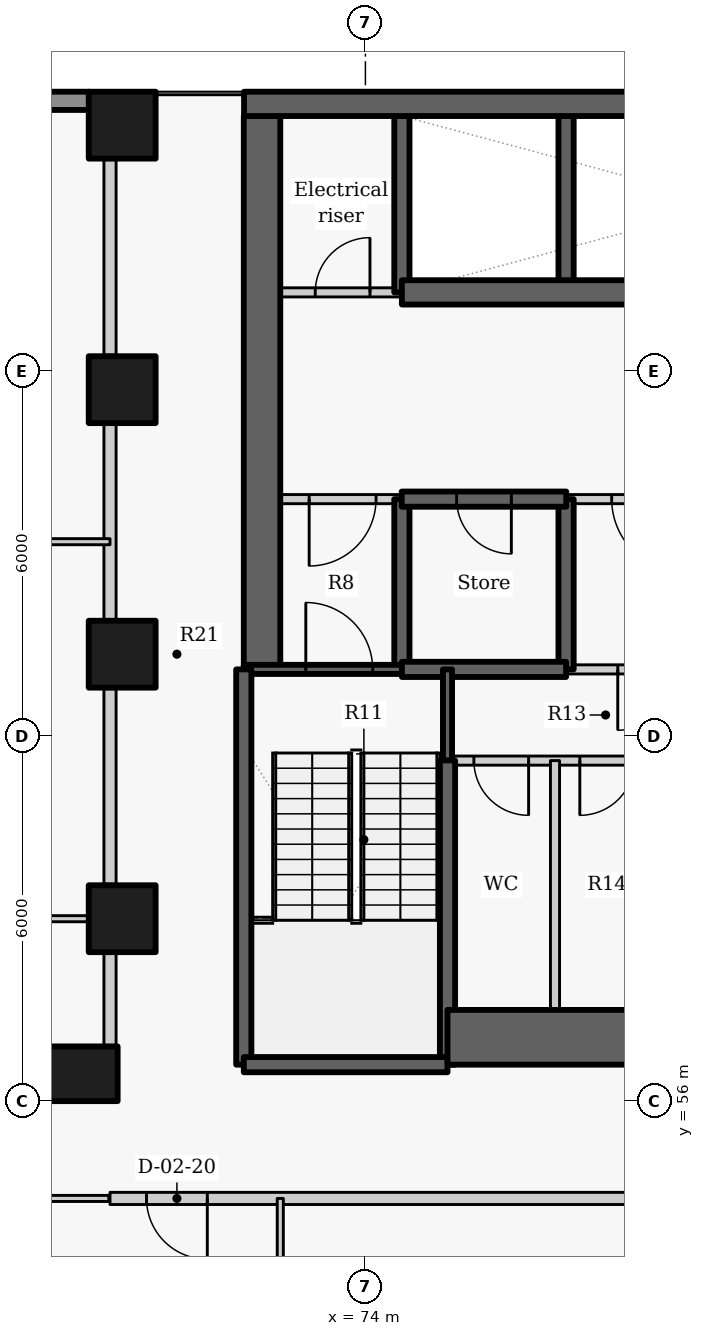
"""IFC4 building model, lengths in metres.
Left out: names, types, materials, properties, quantities, classifications, styles, units other than length and angle.
Written with IfcOpenShell. Run it as: python <this file> out.ifc"""

import sys

from ifc_helpers import new_model, si_unit, direction, frame, frame_2d, origin, origin_2d, place, context, subcontext, project, spatial, rectangle, extrude, element, fill, save


model = new_model("IFC4")
c1 = context("Model", 3, precision=1e-05, world=origin(), true_north=direction((0.0, 1.0)))
c2 = subcontext(c1, "Body", "Model", "MODEL_VIEW")
j1 = project(units=[si_unit("LENGTHUNIT", "METRE"), si_unit("PLANEANGLEUNIT", "RADIAN")], contexts=[c1])
p1 = place(None, origin())
s1 = spatial("IfcSite", under=j1, at=p1, CompositionType="ELEMENT")
p2 = place(p1, origin())
s2 = spatial("IfcBuilding", under=s1, at=p2, CompositionType="ELEMENT")
p3 = place(p2, frame((0.0, 0.0, 15.6)))
s3 = spatial("IfcBuildingStorey", under=s2, at=p3, CompositionType="ELEMENT", Elevation=15.6)
p4 = place(p3, frame((69.175, 56.45, 0.0), z_axis=(0.0, 0.0, 1.0), x_axis=(1.0, 0.0, 0.0)))
e1 = element("IfcColumn", 1, at=p4, inside=s3, PredefinedType="COLUMN", context=c2, shape_type="SweptSolid", body=[
    extrude(rectangle(XDim=1.5, YDim=0.9, at=origin_2d()), origin(), (0.0, 0.0, 1.0), 4.2),
])
for number, where, z_axis, x_axis in (
    (2, (70.0, 72.05, 0.0), (0.0, 0.0, 1.0), (0.0, -1.0, 0.0)),
    (3, (70.0, 67.7, 0.0), (0.0, 0.0, 1.0), (0.0, -1.0, 0.0)),
    (4, (70.0, 63.35, 0.0), (0.0, 0.0, 1.0), (0.0, -1.0, 0.0)),
    (5, (70.0, 59.0, 0.0), (0.0, 0.0, 1.0), (0.0, -1.0, 0.0)),
):
    element("IfcColumn", number, at=place(p3, frame(where, z_axis=z_axis, x_axis=x_axis)), inside=s3, PredefinedType="COLUMN", context=c2, shape_type="SweptSolid", body=[
        extrude(rectangle(XDim=1.1, YDim=1.1, at=origin_2d()), origin(), (0.0, 0.0, 1.0), 4.2),
    ])
p5 = place(p3, frame((69.454, 72.45, 0.0), z_axis=(0.0, 0.0, 1.0), x_axis=(-1.0, 0.0, 0.0)))
e6 = element("IfcWall", 6, at=p5, inside=s3, PredefinedType="SOLIDWALL", context=c2, shape_type="SweptSolid", body=[
    extrude(rectangle(XDim=6.016, YDim=0.3, at=frame_2d((3.008, 0.0))), origin(), (0.0, 0.0, 1.0), 3.0),
])
p6 = place(p5, frame((1.958, 0.0, 0.9)))
e7 = element("IfcOpeningElement", 7, at=p6, cuts=e6, PredefinedType="OPENING", context=c2, shape_type="SweptSolid", body=[
    extrude(rectangle(XDim=2.1, YDim=2.05, at=frame_2d((1.05, 1.025))), frame((0.0, 0.16, 0.0), z_axis=(0.0, -1.0, 0.0), x_axis=(1.0, 0.0, 0.0)), (0.0, 0.0, 1.0), 0.32),
])
p7 = place(p3, frame((74.6, 63.1, -0.3), z_axis=(0.0, 0.0, 1.0), x_axis=(0.0, 1.0, 0.0)))
e8 = element("IfcWall", 8, at=p7, inside=s3, PredefinedType="SHEAR", context=c2, shape_type="SweptSolid", body=[
    extrude(rectangle(XDim=2.8, YDim=0.25, at=frame_2d((1.4, 0.0))), origin(), (0.0, 0.0, 1.0), 4.2),
])
p8 = place(p3, frame((74.6, 69.3, -0.3), z_axis=(0.0, 0.0, 1.0), x_axis=(0.0, 1.0, 0.0)))
e9 = element("IfcWall", 9, at=p8, inside=s3, PredefinedType="SHEAR", context=c2, shape_type="SweptSolid", body=[
    extrude(rectangle(XDim=2.9, YDim=0.25, at=frame_2d((1.45, 0.0))), origin(), (0.0, 0.0, 1.0), 4.2),
])
p9 = place(p3, frame((72.0, 69.3, 0.0), z_axis=(0.0, 0.0, 1.0), x_axis=(1.0, 0.0, 0.0)))
e10 = element("IfcWall", 10, at=p9, inside=s3, PredefinedType="PARTITIONING", context=c2, shape_type="SweptSolid", body=[
    extrude(rectangle(XDim=2.6, YDim=0.15, at=frame_2d((1.3, 0.0))), origin(), (0.0, 0.0, 1.0), 3.9),
])
p10 = place(p9, frame((1.175, 0.0, 0.0)))
e11 = element("IfcOpeningElement", 11, at=p10, cuts=e10, PredefinedType="OPENING", context=c2, shape_type="SweptSolid", body=[
    extrude(rectangle(XDim=0.9, YDim=2.1, at=frame_2d((0.45, 1.05))), frame((0.0, 0.085, 0.0), z_axis=(0.0, -1.0, 0.0), x_axis=(1.0, 0.0, 0.0)), (0.0, 0.0, 1.0), 0.17),
])
p11 = place(p3, frame((72.3, 63.1, -0.3), z_axis=(0.0, 0.0, 1.0), x_axis=(0.0, 1.0, 0.0)))
e12 = element("IfcWall", 12, at=p11, inside=s3, PredefinedType="SHEAR", context=c2, shape_type="SweptSolid", body=[
    extrude(rectangle(XDim=9.1, YDim=0.6, at=frame_2d((4.55, 0.0))), origin(), (0.0, 0.0, 1.0), 4.2),
])
p12 = place(p3, frame((77.3, 63.1, -0.3), z_axis=(0.0, 0.0, 1.0), x_axis=(0.0, 1.0, 0.0)))
e13 = element("IfcWall", 13, at=p12, inside=s3, PredefinedType="SHEAR", context=c2, shape_type="SweptSolid", body=[
    extrude(rectangle(XDim=2.8, YDim=0.25, at=frame_2d((1.4, 0.0))), origin(), (0.0, 0.0, 1.0), 4.2),
])
p13 = place(p3, frame((77.3, 69.3, -0.3), z_axis=(0.0, 0.0, 1.0), x_axis=(0.0, 1.0, 0.0)))
e14 = element("IfcWall", 14, at=p13, inside=s3, PredefinedType="SHEAR", context=c2, shape_type="SweptSolid", body=[
    extrude(rectangle(XDim=2.9, YDim=0.25, at=frame_2d((1.45, 0.0))), origin(), (0.0, 0.0, 1.0), 4.2),
])
p14 = place(p3, frame((74.6, 69.3, -0.3), z_axis=(0.0, 0.0, 1.0), x_axis=(1.0, 0.0, 0.0)))
e15 = element("IfcWall", 15, at=p14, inside=s3, PredefinedType="SHEAR", context=c2, shape_type="SweptSolid", body=[
    extrude(rectangle(XDim=10.8, YDim=0.4, at=frame_2d((5.4, 0.0))), origin(), (0.0, 0.0, 1.0), 4.2),
])
p15 = place(p3, frame((74.603, 65.9, 0.0), z_axis=(0.0, 0.0, 1.0), x_axis=(-1.0, 0.0, 0.0)))
e16 = element("IfcWall", 16, at=p15, inside=s3, PredefinedType="PARTITIONING", context=c2, shape_type="SweptSolid", body=[
    extrude(rectangle(XDim=2.603, YDim=0.15, at=frame_2d((1.302, 0.0))), origin(), (0.0, 0.0, 1.0), 3.9),
])
p16 = place(p15, frame((0.428, 0.0, 0.0)))
e17 = element("IfcOpeningElement", 17, at=p16, cuts=e16, PredefinedType="OPENING", context=c2, shape_type="SweptSolid", body=[
    extrude(rectangle(XDim=1.1, YDim=2.1, at=frame_2d((0.55, 1.05))), frame((0.0, 0.085, 0.0), z_axis=(0.0, -1.0, 0.0), x_axis=(1.0, 0.0, 0.0)), (0.0, 0.0, 1.0), 0.17),
])
p17 = place(p3, frame((80.003, 65.9, 0.0), z_axis=(0.0, 0.0, 1.0), x_axis=(-1.0, 0.0, 0.0)))
e18 = element("IfcWall", 18, at=p17, inside=s3, PredefinedType="PARTITIONING", context=c2, shape_type="SweptSolid", body=[
    extrude(rectangle(XDim=2.706, YDim=0.15, at=frame_2d((1.353, 0.0))), origin(), (0.0, 0.0, 1.0), 3.9),
])
p18 = place(p17, frame((0.753, 0.0, 0.0)))
e19 = element("IfcOpeningElement", 19, at=p18, cuts=e18, PredefinedType="OPENING", context=c2, shape_type="SweptSolid", body=[
    extrude(rectangle(XDim=1.2, YDim=2.1, at=frame_2d((0.6, 1.05))), frame((0.0, 0.085, 0.0), z_axis=(0.0, -1.0, 0.0), x_axis=(1.0, 0.0, 0.0)), (0.0, 0.0, 1.0), 0.17),
])
p19 = place(p3, frame((77.303, 65.9, -0.3), z_axis=(0.0, 0.0, 1.0), x_axis=(-1.0, 0.0, 0.0)))
e20 = element("IfcWall", 20, at=p19, inside=s3, PredefinedType="SHEAR", context=c2, shape_type="SweptSolid", body=[
    extrude(rectangle(XDim=2.706, YDim=0.25, at=frame_2d((1.353, 0.0))), origin(), (0.0, 0.0, 1.0), 4.2),
])
p20 = place(p19, frame((0.903, 0.0, 0.3)))
e21 = element("IfcOpeningElement", 21, at=p20, cuts=e20, PredefinedType="OPENING", context=c2, shape_type="SweptSolid", body=[
    extrude(rectangle(XDim=0.9, YDim=2.1, at=frame_2d((0.45, 1.05))), frame((0.0, 0.135, 0.0), z_axis=(0.0, -1.0, 0.0), x_axis=(1.0, 0.0, 0.0)), (0.0, 0.0, 1.0), 0.27),
])
p21 = place(p3, frame((72.0, 63.1, -0.3), z_axis=(0.0, 0.0, 1.0), x_axis=(1.0, 0.0, 0.0)))
e22 = element("IfcWall", 22, at=p21, inside=s3, PredefinedType="SHEAR", context=c2, shape_type="SweptSolid", body=[
    extrude(rectangle(XDim=2.6, YDim=0.15, at=frame_2d((1.3, 0.0))), origin(), (0.0, 0.0, 1.0), 4.2),
])
p22 = place(p21, frame((1.02, 0.0, 0.3)))
e23 = element("IfcOpeningElement", 23, at=p22, cuts=e22, PredefinedType="OPENING", context=c2, shape_type="SweptSolid", body=[
    extrude(rectangle(XDim=1.1, YDim=2.1, at=frame_2d((0.55, 1.05))), frame((0.0, 0.085, 0.0), z_axis=(0.0, -1.0, 0.0), x_axis=(1.0, 0.0, 0.0)), (0.0, 0.0, 1.0), 0.17),
])
p23 = place(p3, frame((74.6, 63.1, -0.3), z_axis=(0.0, 0.0, 1.0), x_axis=(1.0, 0.0, 0.0)))
e24 = element("IfcWall", 24, at=p23, inside=s3, PredefinedType="SHEAR", context=c2, shape_type="SweptSolid", body=[
    extrude(rectangle(XDim=2.7, YDim=0.25, at=frame_2d((1.35, 0.0))), origin(), (0.0, 0.0, 1.0), 4.2),
])
p24 = place(p3, frame((80.0, 63.1, 0.0), z_axis=(0.0, 0.0, 1.0), x_axis=(-1.0, 0.0, 0.0)))
e25 = element("IfcWall", 25, at=p24, inside=s3, PredefinedType="PARTITIONING", context=c2, shape_type="SweptSolid", body=[
    extrude(rectangle(XDim=2.7, YDim=0.15, at=frame_2d((1.35, 0.0))), origin(), (0.0, 0.0, 1.0), 3.9),
])
p25 = place(p24, frame((0.85, 0.0, 0.0)))
e26 = element("IfcOpeningElement", 26, at=p25, cuts=e25, PredefinedType="OPENING", context=c2, shape_type="SweptSolid", body=[
    extrude(rectangle(XDim=1.0, YDim=2.1, at=frame_2d((0.5, 1.05))), frame((0.0, 0.085, 0.0), z_axis=(0.0, -1.0, 0.0), x_axis=(1.0, 0.0, 0.0)), (0.0, 0.0, 1.0), 0.17),
])
p26 = place(p3, frame((75.35, 61.597, -0.3), z_axis=(0.0, 0.0, 1.0), x_axis=(0.0, 1.0, 0.0)))
e27 = element("IfcWall", 27, at=p26, inside=s3, PredefinedType="SHEAR", context=c2, shape_type="SweptSolid", body=[
    extrude(rectangle(XDim=1.503, YDim=0.15, at=frame_2d((0.751, 0.0))), origin(), (0.0, 0.0, 1.0), 4.2),
])
p27 = place(p3, frame((75.35, 56.6, -0.3), z_axis=(0.0, 0.0, 1.0), x_axis=(0.0, 1.0, 0.0)))
e28 = element("IfcWall", 28, at=p27, inside=s3, PredefinedType="SHEAR", context=c2, shape_type="SweptSolid", body=[
    extrude(rectangle(XDim=5.003, YDim=0.25, at=frame_2d((2.501, 0.0))), origin(), (0.0, 0.0, 1.0), 4.2),
])
p28 = place(p3, frame((72.0, 56.6, -0.3), z_axis=(0.0, 0.0, 1.0), x_axis=(0.0, 1.0, 0.0)))
e29 = element("IfcWall", 29, at=p28, inside=s3, PredefinedType="SHEAR", context=c2, shape_type="SweptSolid", body=[
    extrude(rectangle(XDim=6.5, YDim=0.25, at=frame_2d((3.25, 0.0))), origin(), (0.0, 0.0, 1.0), 4.2),
])
p29 = place(p3, frame((72.0, 56.6, -0.3), z_axis=(0.0, 0.0, 1.0), x_axis=(1.0, 0.0, 0.0)))
e30 = element("IfcWall", 30, at=p29, inside=s3, PredefinedType="SHEAR", context=c2, shape_type="SweptSolid", body=[
    extrude(rectangle(XDim=3.35, YDim=0.25, at=frame_2d((1.675, 0.0))), origin(), (0.0, 0.0, 1.0), 4.2),
])
p30 = place(p3, frame((75.35, 57.05, -0.3), z_axis=(0.0, 0.0, 1.0), x_axis=(1.0, 0.0, 0.0)))
e31 = element("IfcWall", 31, at=p30, inside=s3, PredefinedType="SHEAR", context=c2, shape_type="SweptSolid", body=[
    extrude(rectangle(XDim=5.2, YDim=0.9, at=frame_2d((2.6, 0.0))), origin(), (0.0, 0.0, 1.0), 4.2),
])
p31 = place(p3, frame((80.55, 61.6, 0.0), z_axis=(0.0, 0.0, 1.0), x_axis=(-1.0, 0.0, 0.0)))
e32 = element("IfcWall", 32, at=p31, inside=s3, PredefinedType="PARTITIONING", context=c2, shape_type="SweptSolid", body=[
    extrude(rectangle(XDim=5.2, YDim=0.15, at=frame_2d((2.6, 0.0))), origin(), (0.0, 0.0, 1.0), 3.9),
])
p32 = place(p31, frame((3.866, 0.0, 0.0)))
e33 = element("IfcOpeningElement", 33, at=p32, cuts=e32, PredefinedType="OPENING", context=c2, shape_type="SweptSolid", body=[
    extrude(rectangle(XDim=0.9, YDim=2.1, at=frame_2d((0.45, 1.05))), frame((0.0, 0.085, 0.0), z_axis=(0.0, -1.0, 0.0), x_axis=(1.0, 0.0, 0.0)), (0.0, 0.0, 1.0), 0.17),
])
p33 = place(p31, frame((2.124, 0.0, 0.0)))
e34 = element("IfcOpeningElement", 34, at=p33, cuts=e32, PredefinedType="OPENING", context=c2, shape_type="SweptSolid", body=[
    extrude(rectangle(XDim=0.9, YDim=2.1, at=frame_2d((0.45, 1.05))), frame((0.0, 0.085, 0.0), z_axis=(0.0, -1.0, 0.0), x_axis=(1.0, 0.0, 0.0)), (0.0, 0.0, 1.0), 0.17),
])
p34 = place(p31, frame((0.408, 0.0, 0.0)))
e35 = element("IfcOpeningElement", 35, at=p34, cuts=e32, PredefinedType="OPENING", context=c2, shape_type="SweptSolid", body=[
    extrude(rectangle(XDim=0.9, YDim=2.1, at=frame_2d((0.45, 1.05))), frame((0.0, 0.085, 0.0), z_axis=(0.0, -1.0, 0.0), x_axis=(1.0, 0.0, 0.0)), (0.0, 0.0, 1.0), 0.17),
])
p35 = place(p3, frame((77.118, 56.6, 0.0), z_axis=(0.0, 0.0, 1.0), x_axis=(0.0, 1.0, 0.0)))
e36 = element("IfcWall", 36, at=p35, inside=s3, PredefinedType="PARTITIONING", context=c2, shape_type="SweptSolid", body=[
    extrude(rectangle(XDim=5.0, YDim=0.15, at=frame_2d((2.5, 0.0))), origin(), (0.0, 0.0, 1.0), 3.9),
])
p36 = place(p3, frame((69.8, 56.917, 0.0), z_axis=(0.0, 0.0, 1.0), x_axis=(0.0, 1.0, 0.0)))
e37 = element("IfcWall", 37, at=p36, inside=s3, PredefinedType="PARTITIONING", context=c2, shape_type="SweptSolid", body=[
    extrude(rectangle(XDim=1.516, YDim=0.2, at=frame_2d((0.758, 0.0))), origin(), (0.0, 0.0, 1.0), 3.9),
])
for number, where, z_axis, x_axis in (
    (38, (69.8, 59.567, 0.0), (0.0, 0.0, 1.0), (0.0, 1.0, 0.0)),
    (39, (69.8, 63.917, 0.0), (0.0, 0.0, 1.0), (0.0, 1.0, 0.0)),
):
    element("IfcWall", number, at=place(p3, frame(where, z_axis=z_axis, x_axis=x_axis)), inside=s3, PredefinedType="PARTITIONING", context=c2, shape_type="SweptSolid", body=[
        extrude(rectangle(XDim=3.216, YDim=0.2, at=frame_2d((1.608, 0.0))), origin(), (0.0, 0.0, 1.0), 3.13),
    ])
p37 = place(p3, frame((69.8, 68.267, 0.0), z_axis=(0.0, 0.0, 1.0), x_axis=(0.0, 1.0, 0.0)))
e40 = element("IfcWall", 40, at=p37, inside=s3, PredefinedType="PARTITIONING", context=c2, shape_type="SweptSolid", body=[
    extrude(rectangle(XDim=3.216, YDim=0.2, at=frame_2d((1.608, 0.0))), origin(), (0.0, 0.0, 1.0), 3.13),
])
p38 = place(p3, frame((90.2, 54.4, 0.0), z_axis=(0.0, 0.0, 1.0), x_axis=(-1.0, 0.0, 0.0)))
e41 = element("IfcWall", 41, at=p38, inside=s3, PredefinedType="PARTITIONING", context=c2, shape_type="SweptSolid", body=[
    extrude(rectangle(XDim=20.4, YDim=0.2, at=frame_2d((10.2, 0.0))), origin(), (0.0, 0.0, 1.0), 3.9),
])
p39 = place(p38, frame((18.8, 0.0, 0.0)))
e42 = element("IfcOpeningElement", 42, at=p39, cuts=e41, PredefinedType="OPENING", context=c2, shape_type="SweptSolid", body=[
    extrude(rectangle(XDim=1.0, YDim=2.1, at=frame_2d((0.5, 1.05))), frame((0.0, 0.11, 0.0), z_axis=(0.0, -1.0, 0.0), x_axis=(1.0, 0.0, 0.0)), (0.0, 0.0, 1.0), 0.22),
])
p40 = place(p38, frame((0.6, 0.0, 0.0)))
e43 = element("IfcOpeningElement", 43, at=p40, cuts=e41, PredefinedType="OPENING", context=c2, shape_type="SweptSolid", body=[
    extrude(rectangle(XDim=1.0, YDim=2.1, at=frame_2d((0.5, 1.05))), frame((0.0, 0.11, 0.0), z_axis=(0.0, -1.0, 0.0), x_axis=(1.0, 0.0, 0.0)), (0.0, 0.0, 1.0), 0.22),
])
p41 = place(p38, frame((10.1, 0.0, 0.0)))
e44 = element("IfcOpeningElement", 44, at=p41, cuts=e41, PredefinedType="OPENING", context=c2, shape_type="SweptSolid", body=[
    extrude(rectangle(XDim=1.0, YDim=2.1, at=frame_2d((0.5, 1.05))), frame((0.0, 0.11, 0.0), z_axis=(0.0, -1.0, 0.0), x_axis=(1.0, 0.0, 0.0)), (0.0, 0.0, 1.0), 0.22),
])
p42 = place(p3, frame((62.434, 65.2, 0.0), z_axis=(0.0, 0.0, 1.0), x_axis=(1.0, 0.0, 0.0)))
e45 = element("IfcWall", 45, at=p42, inside=s3, PredefinedType="PARTITIONING", context=c2, shape_type="SweptSolid", body=[
    extrude(rectangle(XDim=7.366, YDim=0.1, at=frame_2d((3.683, 0.0))), origin(), (0.0, 0.0, 1.0), 3.9),
])
p43 = place(p3, frame((65.495, 59.0, 0.0), z_axis=(0.0, 0.0, 1.0), x_axis=(1.0, 0.0, 0.0)))
e46 = element("IfcWall", 46, at=p43, inside=s3, PredefinedType="PARTITIONING", context=c2, shape_type="SweptSolid", body=[
    extrude(rectangle(XDim=3.935, YDim=0.1, at=frame_2d((1.967, 0.0))), origin(), (0.0, 0.0, 1.0), 3.9),
])
p44 = place(p3, frame((72.6, 47.3, 0.0), z_axis=(0.0, 0.0, 1.0), x_axis=(0.0, 1.0, 0.0)))
e47 = element("IfcWall", 47, at=p44, inside=s3, PredefinedType="PARTITIONING", context=c2, shape_type="SweptSolid", body=[
    extrude(rectangle(XDim=7.1, YDim=0.1, at=frame_2d((3.55, 0.0))), origin(), (0.0, 0.0, 1.0), 3.13),
])
p45 = place(p3, frame((59.52, 54.4, 0.0), z_axis=(0.0, 0.0, 1.0), x_axis=(1.0, 0.0, 0.0)))
e48 = element("IfcWall", 48, at=p45, inside=s3, PredefinedType="PARTITIONING", context=c2, shape_type="SweptSolid", body=[
    extrude(rectangle(XDim=10.26, YDim=0.1, at=frame_2d((5.13, 0.0))), origin(), (0.0, 0.0, 1.0), 3.9),
])
p46 = place(p3, frame((72.004, 72.4, -0.3), z_axis=(0.0, 0.0, 1.0), x_axis=(1.0, 0.0, 0.0)))
e49 = element("IfcWall", 49, at=p46, inside=s3, PredefinedType="SHEAR", context=c2, shape_type="SweptSolid", body=[
    extrude(rectangle(XDim=15.992, YDim=0.4, at=frame_2d((7.996, 0.0))), origin(), (0.0, 0.0, 1.0), 4.2),
])
p47 = place(p10, origin())
e50 = element("IfcDoor", 50, at=p47, inside=s3, OperationType="SINGLE_SWING_RIGHT", PredefinedType="DOOR", context=c2, shape_type="SweptSolid", body=[
    extrude(rectangle(XDim=0.9, YDim=2.1, at=frame_2d((0.45, 1.05))), frame((0.0, 0.025, 0.0), z_axis=(0.0, -1.0, 0.0), x_axis=(1.0, 0.0, 0.0)), (0.0, 0.0, 1.0), 0.05),
])
fill(e11, e50)
p48 = place(p16, origin())
e51 = element("IfcDoor", 51, at=p48, inside=s3, OperationType="SINGLE_SWING_RIGHT", PredefinedType="DOOR", context=c2, shape_type="SweptSolid", body=[
    extrude(rectangle(XDim=1.1, YDim=2.1, at=frame_2d((0.55, 1.05))), frame((0.0, 0.025, 0.0), z_axis=(0.0, -1.0, 0.0), x_axis=(1.0, 0.0, 0.0)), (0.0, 0.0, 1.0), 0.05),
])
fill(e17, e51)
p49 = place(p20, origin())
e52 = element("IfcDoor", 52, at=p49, inside=s3, OperationType="SINGLE_SWING_LEFT", PredefinedType="DOOR", context=c2, shape_type="SweptSolid", body=[
    extrude(rectangle(XDim=0.9, YDim=2.1, at=frame_2d((0.45, 1.05))), frame((0.0, 0.025, 0.0), z_axis=(0.0, -1.0, 0.0), x_axis=(1.0, 0.0, 0.0)), (0.0, 0.0, 1.0), 0.05),
])
fill(e21, e52)
p50 = place(p18, origin())
e53 = element("IfcDoor", 53, at=p50, inside=s3, OperationType="DOUBLE_DOOR_SINGLE_SWING", PredefinedType="DOOR", context=c2, shape_type="SweptSolid", body=[
    extrude(rectangle(XDim=1.2, YDim=2.1, at=frame_2d((0.6, 1.05))), frame((0.0, 0.025, 0.0), z_axis=(0.0, -1.0, 0.0), x_axis=(1.0, 0.0, 0.0)), (0.0, 0.0, 1.0), 0.05),
])
fill(e19, e53)
p51 = place(p25, origin())
e54 = element("IfcDoor", 54, at=p51, inside=s3, OperationType="SINGLE_SWING_RIGHT", PredefinedType="DOOR", context=c2, shape_type="SweptSolid", body=[
    extrude(rectangle(XDim=1.0, YDim=2.1, at=frame_2d((0.5, 1.05))), frame((0.0, 0.025, 0.0), z_axis=(0.0, -1.0, 0.0), x_axis=(1.0, 0.0, 0.0)), (0.0, 0.0, 1.0), 0.05),
])
fill(e26, e54)
p52 = place(p32, origin())
e55 = element("IfcDoor", 55, at=p52, inside=s3, OperationType="SINGLE_SWING_LEFT", PredefinedType="DOOR", context=c2, shape_type="SweptSolid", body=[
    extrude(rectangle(XDim=0.9, YDim=2.1, at=frame_2d((0.45, 1.05))), frame((0.0, 0.025, 0.0), z_axis=(0.0, -1.0, 0.0), x_axis=(1.0, 0.0, 0.0)), (0.0, 0.0, 1.0), 0.05),
])
fill(e33, e55)
p53 = place(p33, origin())
e56 = element("IfcDoor", 56, at=p53, inside=s3, OperationType="SINGLE_SWING_RIGHT", PredefinedType="DOOR", context=c2, shape_type="SweptSolid", body=[
    extrude(rectangle(XDim=0.9, YDim=2.1, at=frame_2d((0.45, 1.05))), frame((0.0, 0.025, 0.0), z_axis=(0.0, -1.0, 0.0), x_axis=(1.0, 0.0, 0.0)), (0.0, 0.0, 1.0), 0.05),
])
fill(e34, e56)
p54 = place(p22, origin())
e57 = element("IfcDoor", 57, at=p54, inside=s3, OperationType="SINGLE_SWING_LEFT", PredefinedType="DOOR", context=c2, shape_type="SweptSolid", body=[
    extrude(rectangle(XDim=1.1, YDim=2.1, at=frame_2d((0.55, 1.05))), frame((0.0, 0.025, 0.0), z_axis=(0.0, -1.0, 0.0), x_axis=(1.0, 0.0, 0.0)), (0.0, 0.0, 1.0), 0.05),
])
fill(e23, e57)
p55 = place(p39, origin())
e58 = element("IfcDoor", 58, at=p55, inside=s3, OperationType="SINGLE_SWING_LEFT", PredefinedType="DOOR", context=c2, shape_type="SweptSolid", body=[
    extrude(rectangle(XDim=1.0, YDim=2.1, at=frame_2d((0.5, 1.05))), frame((0.0, 0.025, 0.0), z_axis=(0.0, -1.0, 0.0), x_axis=(1.0, 0.0, 0.0)), (0.0, 0.0, 1.0), 0.05),
])
fill(e42, e58)
save(model, sys.argv[1])
